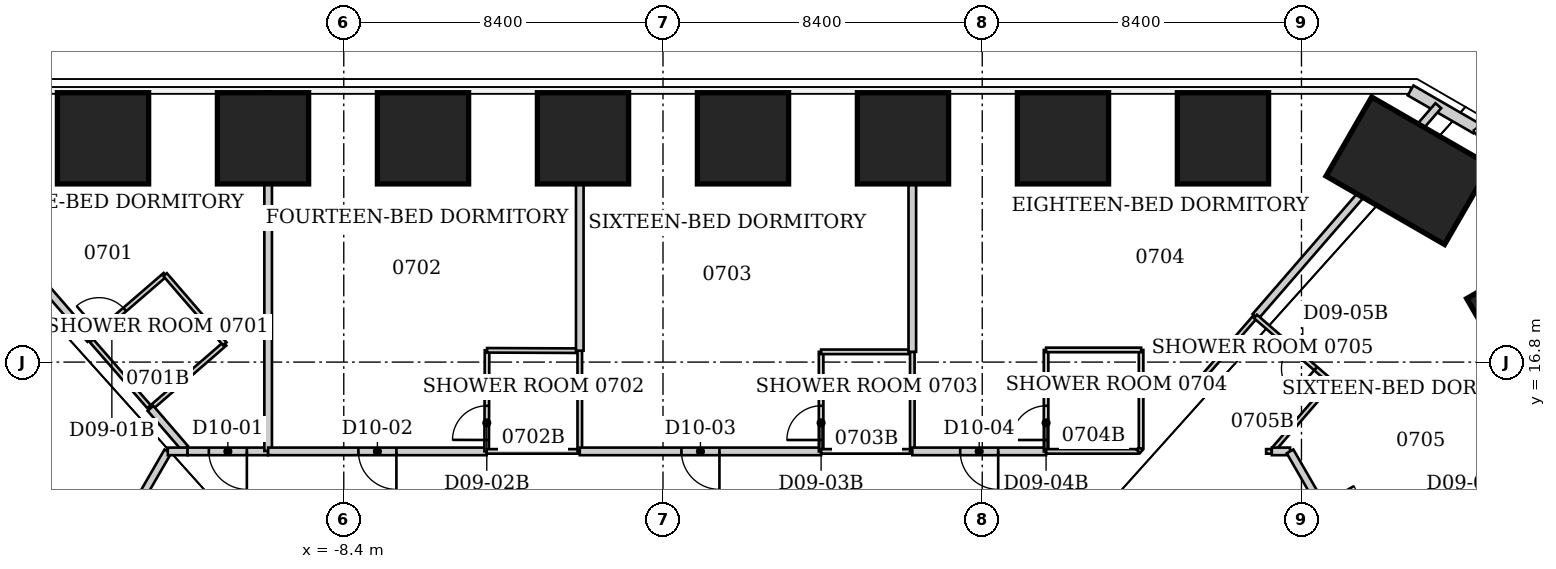
"""IFC4 building model, lengths in metres.
Left out: names, types, materials, properties, quantities, classifications, styles, units other than length and angle.
Written with IfcOpenShell. Run it as: python <this file> out.ifc"""

import sys

from ifc_helpers import new_model, si_unit, direction, frame, frame_2d, origin, origin_2d, place, context, subcontext, project, spatial, rectangle, extrude, element, fill, save


model = new_model("IFC4")
c1 = context("Model", 3, precision=1e-05, world=origin(), true_north=direction((0.0, 1.0)))
c2 = subcontext(c1, "Body", "Model", "MODEL_VIEW")
j1 = project(units=[si_unit("LENGTHUNIT", "METRE"), si_unit("PLANEANGLEUNIT", "RADIAN")], contexts=[c1])
p1 = place(None, origin())
s1 = spatial("IfcSite", under=j1, at=p1, CompositionType="ELEMENT")
p2 = place(p1, origin())
s2 = spatial("IfcBuilding", under=s1, at=p2, CompositionType="ELEMENT")
p3 = place(p2, frame((0.0, 0.0, 34.4)))
s3 = spatial("IfcBuildingStorey", under=s2, at=p3, CompositionType="ELEMENT", Elevation=34.4)
for number, where, z_axis, x_axis in (
    (1, (-14.735, 22.689, 0.0), (0.0, 0.0, 1.0), (0.0, 1.0, 0.0)),
    (2, (-10.525, 22.689, 0.0), (0.0, 0.0, 1.0), (0.0, 1.0, 0.0)),
    (3, (-6.315, 22.689, 0.0), (0.0, 0.0, 1.0), (0.0, 1.0, 0.0)),
    (4, (-2.105, 22.689, 0.0), (0.0, 0.0, 1.0), (0.0, 1.0, 0.0)),
    (5, (2.105, 22.689, 0.0), (0.0, 0.0, 1.0), (0.0, 1.0, 0.0)),
    (6, (6.315, 22.689, 0.0), (0.0, 0.0, 1.0), (0.0, 1.0, 0.0)),
    (7, (10.525, 22.689, 0.0), (0.0, 0.0, 1.0), (0.0, 1.0, 0.0)),
    (8, (14.735, 22.689, 0.0), (0.0, 0.0, 1.0), (0.0, 1.0, 0.0)),
):
    element("IfcColumn", number, at=place(p3, frame(where, z_axis=z_axis, x_axis=x_axis)), inside=s3, PredefinedType="COLUMN", context=c2, shape_type="SweptSolid", body=[
        extrude(rectangle(XDim=2.4, YDim=2.4, at=origin_2d()), origin(), (0.0, 0.0, 1.0), 3.8),
    ])
p4 = place(p3, frame((19.606, 21.835, 0.0), z_axis=(0.0, 0.0, 1.0), x_axis=(0.5, 0.866025403784, 0.0)))
e9 = element("IfcColumn", 9, at=p4, inside=s3, PredefinedType="COLUMN", context=c2, shape_type="SweptSolid", body=[
    extrude(rectangle(XDim=2.4, YDim=3.6, at=origin_2d()), origin(), (0.0, 0.0, 1.0), 3.8),
])
p5 = place(p3, frame((22.788, 18.032, 0.0), z_axis=(0.0, 0.0, 1.0), x_axis=(0.866025403784, 0.5, 0.0)))
e10 = element("IfcColumn", 10, at=p5, inside=s3, PredefinedType="COLUMN", context=c2, shape_type="SweptSolid", body=[
    extrude(rectangle(XDim=2.4, YDim=2.4, at=origin_2d()), origin(), (0.0, 0.0, 1.0), 3.8),
])
p6 = place(p3, frame((19.672, 23.949, 0.0), z_axis=(0.0, 0.0, 1.0), x_axis=(0.866010750942, -0.50002537861, 0.0)))
e11 = element("IfcWall", 11, at=p6, inside=s3, PredefinedType="SOLIDWALL", context=c2, shape_type="SweptSolid", body=[
    extrude(rectangle(XDim=2.0, YDim=0.3, at=frame_2d((1.0, 0.0))), origin(), (0.0, 0.0, 1.0), 3.64),
])
p7 = place(p3, frame((-20.4, 23.547, 0.0), z_axis=(0.0, 0.0, 1.0), x_axis=(0.655107582677, -0.755535608108, 0.0)))
e12 = element("IfcWall", 12, at=p7, inside=s3, PredefinedType="PARTITIONING", context=c2, shape_type="SweptSolid", body=[
    extrude(rectangle(XDim=8.136, YDim=0.2, at=frame_2d((4.068, 0.0))), origin(), (0.0, 0.0, 1.0), 3.64),
])
p8 = place(p3, frame((-16.031, 9.261, 0.0), z_axis=(0.0, 0.0, 1.0), x_axis=(0.500702302597, 0.865619549325, 0.0)))
e13 = element("IfcWall", 13, at=p8, inside=s3, PredefinedType="PARTITIONING", context=c2, shape_type="SweptSolid", body=[
    extrude(rectangle(XDim=5.995, YDim=0.2, at=frame_2d((2.997, 0.0))), origin(), (0.0, 0.0, 1.0), 3.64),
])
p9 = place(p8, frame((2.697, 0.0, 0.0)))
e14 = element("IfcOpeningElement", 14, at=p9, cuts=e13, PredefinedType="OPENING", context=c2, shape_type="SweptSolid", body=[
    extrude(rectangle(XDim=1.0, YDim=2.13, at=frame_2d((0.5, 1.065))), frame((0.0, 0.1, 0.0), z_axis=(0.0, -1.0, 0.0), x_axis=(1.0, 0.0, 0.0)), (0.0, 0.0, 1.0), 0.2),
])
p10 = place(p3, frame((-15.07, 17.4, 0.0), z_axis=(0.0, 0.0, 1.0), x_axis=(0.657083550002, -0.753817755374, 0.0)))
e15 = element("IfcWall", 15, at=p10, inside=s3, PredefinedType="PARTITIONING", context=c2, shape_type="SweptSolid", body=[
    extrude(rectangle(XDim=2.41, YDim=0.12, at=frame_2d((1.205, 0.0))), origin(), (0.0, 0.0, 1.0), 3.64),
])
p11 = place(p3, frame((-13.49, 15.58, 0.0), z_axis=(0.0, 0.0, 1.0), x_axis=(0.755437535555, 0.655220672655, 0.0)))
e16 = element("IfcWall", 16, at=p11, inside=s3, PredefinedType="PARTITIONING", context=c2, shape_type="SweptSolid", body=[
    extrude(rectangle(XDim=2.594, YDim=0.12, at=frame_2d((1.297, 0.0))), origin(), (0.0, 0.0, 1.0), 3.64),
])
p12 = place(p3, frame((-13.486, 15.583, 0.0), z_axis=(0.0, 0.0, 1.0), x_axis=(0.652755533609, -0.75756861956, 0.0)))
e17 = element("IfcWall", 17, at=p12, inside=s3, PredefinedType="PARTITIONING", context=c2, shape_type="SweptSolid", body=[
    extrude(rectangle(XDim=1.391, YDim=0.2, at=frame_2d((0.695, 0.0))), origin(), (0.0, 0.0, 1.0), 3.64),
])
p13 = place(p3, frame((-13.1, 19.1, 0.0), z_axis=(0.0, 0.0, 1.0), x_axis=(-0.757040252764, -0.65336823897, 0.0)))
e18 = element("IfcWall", 18, at=p13, inside=s3, PredefinedType="PARTITIONING", context=c2, shape_type="SweptSolid", body=[
    extrude(rectangle(XDim=2.602, YDim=0.12, at=frame_2d((1.301, 0.0))), origin(), (0.0, 0.0, 1.0), 3.64),
])
p14 = place(p13, frame((1.402, 0.0, 0.0)))
e19 = element("IfcOpeningElement", 19, at=p14, cuts=e18, PredefinedType="OPENING", context=c2, shape_type="SweptSolid", body=[
    extrude(rectangle(XDim=0.9, YDim=2.03, at=frame_2d((0.45, 1.015))), frame((0.0, 0.06, 0.0), z_axis=(0.0, -1.0, 0.0), x_axis=(1.0, 0.0, 0.0)), (0.0, 0.0, 1.0), 0.12),
])
p15 = place(p3, frame((-12.51, 14.45, 0.0), z_axis=(0.0, 0.0, 1.0), x_axis=(-1.0, 0.0, 0.0)))
e20 = element("IfcWall", 20, at=p15, inside=s3, PredefinedType="PARTITIONING", context=c2, shape_type="SweptSolid", body=[
    extrude(rectangle(XDim=0.52, YDim=0.2, at=frame_2d((0.26, 0.0))), origin(), (0.0, 0.0, 1.0), 3.64),
])
p16 = place(p3, frame((-11.53, 17.28, 0.0), z_axis=(0.0, 0.0, 1.0), x_axis=(-0.653188728136, 0.757195143563, 0.0)))
e21 = element("IfcWall", 21, at=p16, inside=s3, PredefinedType="PARTITIONING", context=c2, shape_type="SweptSolid", body=[
    extrude(rectangle(XDim=2.404, YDim=0.12, at=frame_2d((1.202, 0.0))), origin(), (0.0, 0.0, 1.0), 3.64),
])
p17 = place(p3, frame((-10.39, 14.45, 0.0), z_axis=(0.0, 0.0, 1.0), x_axis=(-1.0, 0.0, 0.0)))
e22 = element("IfcWall", 22, at=p17, inside=s3, PredefinedType="PARTITIONING", context=c2, shape_type="SweptSolid", body=[
    extrude(rectangle(XDim=2.12, YDim=0.2, at=frame_2d((1.06, 0.0))), origin(), (0.0, 0.0, 1.0), 3.64),
])
p18 = place(p17, frame((0.56, 0.0, 0.0)))
e23 = element("IfcOpeningElement", 23, at=p18, cuts=e22, PredefinedType="OPENING", context=c2, shape_type="SweptSolid", body=[
    extrude(rectangle(XDim=1.0, YDim=2.13, at=frame_2d((0.5, 1.065))), frame((0.0, 0.1, 0.0), z_axis=(0.0, -1.0, 0.0), x_axis=(1.0, 0.0, 0.0)), (0.0, 0.0, 1.0), 0.2),
])
p19 = place(p3, frame((-10.39, 23.92, 0.0), z_axis=(0.0, 0.0, 1.0), x_axis=(0.0, -1.0, 0.0)))
e24 = element("IfcWall", 24, at=p19, inside=s3, PredefinedType="PARTITIONING", context=c2, shape_type="SweptSolid", body=[
    extrude(rectangle(XDim=9.46, YDim=0.2, at=frame_2d((4.73, 0.0))), origin(), (0.0, 0.0, 1.0), 3.64),
])
p20 = place(p3, frame((-4.64, 14.45, 0.0), z_axis=(0.0, 0.0, 1.0), x_axis=(-1.0, 0.0, 0.0)))
e25 = element("IfcWall", 25, at=p20, inside=s3, PredefinedType="PARTITIONING", context=c2, shape_type="SweptSolid", body=[
    extrude(rectangle(XDim=5.75, YDim=0.2, at=frame_2d((2.875, 0.0))), origin(), (0.0, 0.0, 1.0), 3.64),
])
p21 = place(p20, frame((2.375, 0.0, 0.0)))
e26 = element("IfcOpeningElement", 26, at=p21, cuts=e25, PredefinedType="OPENING", context=c2, shape_type="SweptSolid", body=[
    extrude(rectangle(XDim=1.0, YDim=2.13, at=frame_2d((0.5, 1.065))), frame((0.0, 0.1, 0.0), z_axis=(0.0, -1.0, 0.0), x_axis=(1.0, 0.0, 0.0)), (0.0, 0.0, 1.0), 0.2),
])
p22 = place(p3, frame((-4.63, 17.11, 0.0), z_axis=(0.0, 0.0, 1.0), x_axis=(-0.003762822113, -0.99999292056, 0.0)))
e27 = element("IfcWall", 27, at=p22, inside=s3, PredefinedType="PARTITIONING", context=c2, shape_type="SweptSolid", body=[
    extrude(rectangle(XDim=2.66, YDim=0.12, at=frame_2d((1.33, 0.0))), origin(), (0.0, 0.0, 1.0), 3.64),
])
p23 = place(p22, frame((1.46, 0.0, 0.0)))
e28 = element("IfcOpeningElement", 28, at=p23, cuts=e27, PredefinedType="OPENING", context=c2, shape_type="SweptSolid", body=[
    extrude(rectangle(XDim=0.9, YDim=2.03, at=frame_2d((0.45, 1.015))), frame((0.0, 0.06, 0.0), z_axis=(0.0, -1.0, 0.0), x_axis=(1.0, 0.0, 0.0)), (0.0, 0.0, 1.0), 0.12),
])
p24 = place(p3, frame((-2.19, 14.45, 0.0), z_axis=(0.0, 0.0, 1.0), x_axis=(-1.0, 0.0, 0.0)))
e29 = element("IfcWall", 29, at=p24, inside=s3, PredefinedType="PARTITIONING", context=c2, shape_type="SweptSolid", body=[
    extrude(rectangle(XDim=2.45, YDim=0.12, at=frame_2d((1.225, 0.0))), origin(), (0.0, 0.0, 1.0), 3.64),
])
p25 = place(p3, frame((-2.19, 17.1, 0.0), z_axis=(0.0, 0.0, 1.0), x_axis=(-0.999991585011, 0.004102426955, 0.0)))
e30 = element("IfcWall", 30, at=p25, inside=s3, PredefinedType="PARTITIONING", context=c2, shape_type="SweptSolid", body=[
    extrude(rectangle(XDim=2.44, YDim=0.12, at=frame_2d((1.22, 0.0))), origin(), (0.0, 0.0, 1.0), 3.64),
])
p26 = place(p3, frame((-2.19, 17.1, 0.0), z_axis=(0.0, 0.0, 1.0), x_axis=(0.0, -1.0, 0.0)))
e31 = element("IfcWall", 31, at=p26, inside=s3, PredefinedType="PARTITIONING", context=c2, shape_type="SweptSolid", body=[
    extrude(rectangle(XDim=2.65, YDim=0.12, at=frame_2d((1.325, 0.0))), origin(), (0.0, 0.0, 1.0), 2.878),
])
p27 = place(p3, frame((-2.19, 23.83, 0.0), z_axis=(0.0, 0.0, 1.0), x_axis=(0.0, -1.0, 0.0)))
e32 = element("IfcWall", 32, at=p27, inside=s3, PredefinedType="PARTITIONING", context=c2, shape_type="SweptSolid", body=[
    extrude(rectangle(XDim=6.73, YDim=0.2, at=frame_2d((3.365, 0.0))), origin(), (0.0, 0.0, 1.0), 2.878),
])
p28 = place(p3, frame((4.16, 14.45, 0.0), z_axis=(0.0, 0.0, 1.0), x_axis=(-1.0, 0.0, 0.0)))
e33 = element("IfcWall", 33, at=p28, inside=s3, PredefinedType="PARTITIONING", context=c2, shape_type="SweptSolid", body=[
    extrude(rectangle(XDim=6.35, YDim=0.2, at=frame_2d((3.175, 0.0))), origin(), (0.0, 0.0, 1.0), 3.64),
])
p29 = place(p28, frame((2.675, 0.0, 0.0)))
e34 = element("IfcOpeningElement", 34, at=p29, cuts=e33, PredefinedType="OPENING", context=c2, shape_type="SweptSolid", body=[
    extrude(rectangle(XDim=1.0, YDim=2.13, at=frame_2d((0.5, 1.065))), frame((0.0, 0.1, 0.0), z_axis=(0.0, -1.0, 0.0), x_axis=(1.0, 0.0, 0.0)), (0.0, 0.0, 1.0), 0.2),
])
p30 = place(p3, frame((4.16, 17.07, 0.0), z_axis=(0.0, 0.0, 1.0), x_axis=(0.0, -1.0, 0.0)))
e35 = element("IfcWall", 35, at=p30, inside=s3, PredefinedType="PARTITIONING", context=c2, shape_type="SweptSolid", body=[
    extrude(rectangle(XDim=2.62, YDim=0.12, at=frame_2d((1.31, 0.0))), origin(), (0.0, 0.0, 1.0), 2.878),
])
p31 = place(p30, frame((1.42, 0.0, 0.0)))
e36 = element("IfcOpeningElement", 36, at=p31, cuts=e35, PredefinedType="OPENING", context=c2, shape_type="SweptSolid", body=[
    extrude(rectangle(XDim=0.9, YDim=2.03, at=frame_2d((0.45, 1.015))), frame((0.0, 0.06, 0.0), z_axis=(0.0, -1.0, 0.0), x_axis=(1.0, 0.0, 0.0)), (0.0, 0.0, 1.0), 0.12),
])
for number, where, z_axis, x_axis in (
    (37, (6.56, 14.45, 0.0), (0.0, 0.0, 1.0), (-1.0, 0.0, 0.0)),
    (38, (6.56, 17.07, 0.0), (0.0, 0.0, 1.0), (-1.0, 0.0, 0.0)),
):
    element("IfcWall", number, at=place(p3, frame(where, z_axis=z_axis, x_axis=x_axis)), inside=s3, PredefinedType="PARTITIONING", context=c2, shape_type="SweptSolid", body=[
        extrude(rectangle(XDim=2.4, YDim=0.12, at=frame_2d((1.2, 0.0))), origin(), (0.0, 0.0, 1.0), 3.64),
    ])
p32 = place(p3, frame((6.56, 17.07, 0.0), z_axis=(0.0, 0.0, 1.0), x_axis=(0.0, -1.0, 0.0)))
e39 = element("IfcWall", 39, at=p32, inside=s3, PredefinedType="PARTITIONING", context=c2, shape_type="SweptSolid", body=[
    extrude(rectangle(XDim=2.62, YDim=0.12, at=frame_2d((1.31, 0.0))), origin(), (0.0, 0.0, 1.0), 3.64),
])
p33 = place(p3, frame((6.56, 23.83, 0.0), z_axis=(0.0, 0.0, 1.0), x_axis=(0.0, -1.0, 0.0)))
e40 = element("IfcWall", 40, at=p33, inside=s3, PredefinedType="PARTITIONING", context=c2, shape_type="SweptSolid", body=[
    extrude(rectangle(XDim=6.76, YDim=0.2, at=frame_2d((3.38, 0.0))), origin(), (0.0, 0.0, 1.0), 3.64),
])
p34 = place(p3, frame((10.08, 14.45, 0.0), z_axis=(0.0, 0.0, 1.0), x_axis=(-1.0, 0.0, 0.0)))
e41 = element("IfcWall", 41, at=p34, inside=s3, PredefinedType="PARTITIONING", context=c2, shape_type="SweptSolid", body=[
    extrude(rectangle(XDim=3.52, YDim=0.2, at=frame_2d((1.76, 0.0))), origin(), (0.0, 0.0, 1.0), 3.64),
])
p35 = place(p34, frame((1.26, 0.0, 0.0)))
e42 = element("IfcOpeningElement", 42, at=p35, cuts=e41, PredefinedType="OPENING", context=c2, shape_type="SweptSolid", body=[
    extrude(rectangle(XDim=1.0, YDim=2.13, at=frame_2d((0.5, 1.065))), frame((0.0, 0.1, 0.0), z_axis=(0.0, -1.0, 0.0), x_axis=(1.0, 0.0, 0.0)), (0.0, 0.0, 1.0), 0.2),
])
p36 = place(p3, frame((10.08, 17.12, 0.0), z_axis=(0.0, 0.0, 1.0), x_axis=(0.0, -1.0, 0.0)))
e43 = element("IfcWall", 43, at=p36, inside=s3, PredefinedType="PARTITIONING", context=c2, shape_type="SweptSolid", body=[
    extrude(rectangle(XDim=2.67, YDim=0.12, at=frame_2d((1.335, 0.0))), origin(), (0.0, 0.0, 1.0), 3.64),
])
p37 = place(p36, frame((1.47, 0.0, 0.0)))
e44 = element("IfcOpeningElement", 44, at=p37, cuts=e43, PredefinedType="OPENING", context=c2, shape_type="SweptSolid", body=[
    extrude(rectangle(XDim=0.9, YDim=2.03, at=frame_2d((0.45, 1.015))), frame((0.0, 0.06, 0.0), z_axis=(0.0, -1.0, 0.0), x_axis=(1.0, 0.0, 0.0)), (0.0, 0.0, 1.0), 0.12),
])
p38 = place(p3, frame((12.51, 14.45, 0.0), z_axis=(0.0, 0.0, 1.0), x_axis=(-1.0, 0.0, 0.0)))
e45 = element("IfcWall", 45, at=p38, inside=s3, PredefinedType="PARTITIONING", context=c2, shape_type="SweptSolid", body=[
    extrude(rectangle(XDim=2.43, YDim=0.12, at=frame_2d((1.215, 0.0))), origin(), (0.0, 0.0, 1.0), 3.64),
])
p39 = place(p3, frame((12.58, 14.53, 0.0), z_axis=(0.0, 0.0, 1.0), x_axis=(-0.658504607869, -0.752576694707, 0.0)))
e46 = element("IfcWall", 46, at=p39, inside=s3, PredefinedType="PARTITIONING", context=c2, shape_type="SweptSolid", body=[
    extrude(rectangle(XDim=0.106, YDim=0.12, at=frame_2d((0.053, 0.0))), origin(), (0.0, 0.0, 1.0), 3.64),
])
p40 = place(p3, frame((12.58, 14.53, 0.0), z_axis=(0.0, 0.0, 1.0), x_axis=(0.0, 1.0, 0.0)))
e47 = element("IfcWall", 47, at=p40, inside=s3, PredefinedType="PARTITIONING", context=c2, shape_type="SweptSolid", body=[
    extrude(rectangle(XDim=2.59, YDim=0.12, at=frame_2d((1.295, 0.0))), origin(), (0.0, 0.0, 1.0), 3.038),
])
p41 = place(p3, frame((12.58, 17.12, 0.0), z_axis=(0.0, 0.0, 1.0), x_axis=(-1.0, 0.0, 0.0)))
e48 = element("IfcWall", 48, at=p41, inside=s3, PredefinedType="PARTITIONING", context=c2, shape_type="SweptSolid", body=[
    extrude(rectangle(XDim=2.5, YDim=0.12, at=frame_2d((1.25, 0.0))), origin(), (0.0, 0.0, 1.0), 3.64),
])
p42 = place(p3, frame((13.95, 16.11, 0.0), z_axis=(0.0, 0.0, 1.0), x_axis=(0.655390967201, 0.75528979876, 0.0)))
e49 = element("IfcWall", 49, at=p42, inside=s3, PredefinedType="PARTITIONING", context=c2, shape_type="SweptSolid", body=[
    extrude(rectangle(XDim=2.502, YDim=0.12, at=frame_2d((1.251, 0.0))), origin(), (0.0, 0.0, 1.0), 3.64),
])
p43 = place(p3, frame((15.59, 18.0, 0.0), z_axis=(0.0, 0.0, 1.0), x_axis=(0.655131789558, 0.755514618197, 0.0)))
e50 = element("IfcWall", 50, at=p43, inside=s3, PredefinedType="PARTITIONING", context=c2, shape_type="SweptSolid", body=[
    extrude(rectangle(XDim=7.343, YDim=0.2, at=frame_2d((3.671, 0.0))), origin(), (0.0, 0.0, 1.0), 3.64),
])
p44 = place(p3, frame((16.02, 14.45, 0.0), z_axis=(0.0, 0.0, 1.0), x_axis=(-1.0, 0.0, 0.0)))
e51 = element("IfcWall", 51, at=p44, inside=s3, PredefinedType="PARTITIONING", context=c2, shape_type="SweptSolid", body=[
    extrude(rectangle(XDim=0.15, YDim=0.12, at=frame_2d((0.075, 0.0))), origin(), (0.0, 0.0, 1.0), 3.64),
])
p45 = place(p3, frame((16.082, 14.522, 0.0), z_axis=(0.0, 0.0, 1.0), x_axis=(0.653217802971, 0.757170061401, 0.0)))
e52 = element("IfcWall", 52, at=p45, inside=s3, PredefinedType="PARTITIONING", context=c2, shape_type="SweptSolid", body=[
    extrude(rectangle(XDim=2.309, YDim=0.12, at=frame_2d((1.154, 0.0))), origin(), (0.0, 0.0, 1.0), 3.64),
])
p46 = place(p3, frame((16.5, 14.45, 0.0), z_axis=(0.0, 0.0, 1.0), x_axis=(-1.0, 0.0, 0.0)))
e53 = element("IfcWall", 53, at=p46, inside=s3, PredefinedType="PARTITIONING", context=c2, shape_type="SweptSolid", body=[
    extrude(rectangle(XDim=0.48, YDim=0.2, at=frame_2d((0.24, 0.0))), origin(), (0.0, 0.0, 1.0), 3.64),
])
p47 = place(p3, frame((16.5, 14.45, 0.0), z_axis=(0.0, 0.0, 1.0), x_axis=(0.499689380994, -0.866204665493, 0.0)))
e54 = element("IfcWall", 54, at=p47, inside=s3, PredefinedType="PARTITIONING", context=c2, shape_type="SweptSolid", body=[
    extrude(rectangle(XDim=4.26, YDim=0.2, at=frame_2d((2.13, 0.0))), origin(), (0.0, 0.0, 1.0), 3.64),
])
p48 = place(p47, frame((1.63, 0.0, 0.0)))
e55 = element("IfcOpeningElement", 55, at=p48, cuts=e54, PredefinedType="OPENING", context=c2, shape_type="SweptSolid", body=[
    extrude(rectangle(XDim=1.0, YDim=2.13, at=frame_2d((0.5, 1.065))), frame((0.0, 0.1, 0.0), z_axis=(0.0, -1.0, 0.0), x_axis=(1.0, 0.0, 0.0)), (0.0, 0.0, 1.0), 0.2),
])
p49 = place(p3, frame((17.59, 16.27, 0.0), z_axis=(0.0, 0.0, 1.0), x_axis=(-0.756316256301, 0.6542061758, 0.0)))
e56 = element("IfcWall", 56, at=p49, inside=s3, PredefinedType="PARTITIONING", context=c2, shape_type="SweptSolid", body=[
    extrude(rectangle(XDim=2.644, YDim=0.12, at=frame_2d((1.322, 0.0))), origin(), (0.0, 0.0, 1.0), 3.64),
])
p50 = place(p49, frame((0.55, 0.0, 0.0)))
e57 = element("IfcOpeningElement", 57, at=p50, cuts=e56, PredefinedType="OPENING", context=c2, shape_type="SweptSolid", body=[
    extrude(rectangle(XDim=0.9, YDim=2.03, at=frame_2d((0.45, 1.015))), frame((0.0, 0.06, 0.0), z_axis=(0.0, -1.0, 0.0), x_axis=(1.0, 0.0, 0.0)), (0.0, 0.0, 1.0), 0.12),
])
p51 = place(p3, frame((20.84, 12.03, 0.0), z_axis=(0.0, 0.0, 1.0), x_axis=(0.865529484494, 0.50085797535, 0.0)))
e58 = element("IfcWall", 58, at=p51, inside=s3, PredefinedType="PARTITIONING", context=c2, shape_type="SweptSolid", body=[
    extrude(rectangle(XDim=5.83, YDim=0.2, at=frame_2d((2.915, 0.0))), origin(), (0.0, 0.0, 1.0), 2.86),
])
p52 = place(p18, origin())
e59 = element("IfcDoor", 59, at=p52, inside=s3, OperationType="SINGLE_SWING_LEFT", PredefinedType="DOOR", context=c2, shape_type="SweptSolid", body=[
    extrude(rectangle(XDim=1.0, YDim=2.13, at=frame_2d((0.5, 1.065))), frame((0.0, 0.025, 0.0), z_axis=(0.0, -1.0, 0.0), x_axis=(1.0, 0.0, 0.0)), (0.0, 0.0, 1.0), 0.05),
])
fill(e23, e59)
p53 = place(p14, origin())
e60 = element("IfcDoor", 60, at=p53, inside=s3, OperationType="SINGLE_SWING_RIGHT", PredefinedType="DOOR", context=c2, shape_type="SweptSolid", body=[
    extrude(rectangle(XDim=0.9, YDim=2.03, at=frame_2d((0.45, 1.015))), frame((0.0, 0.025, 0.0), z_axis=(0.0, -1.0, 0.0), x_axis=(1.0, 0.0, 0.0)), (0.0, 0.0, 1.0), 0.05),
])
fill(e19, e60)
p54 = place(p21, origin())
e61 = element("IfcDoor", 61, at=p54, inside=s3, OperationType="SINGLE_SWING_LEFT", PredefinedType="DOOR", context=c2, shape_type="SweptSolid", body=[
    extrude(rectangle(XDim=1.0, YDim=2.13, at=frame_2d((0.5, 1.065))), frame((0.0, 0.025, 0.0), z_axis=(0.0, -1.0, 0.0), x_axis=(1.0, 0.0, 0.0)), (0.0, 0.0, 1.0), 0.05),
])
fill(e26, e61)
p55 = place(p23, origin())
e62 = element("IfcDoor", 62, at=p55, inside=s3, OperationType="SINGLE_SWING_RIGHT", PredefinedType="DOOR", context=c2, shape_type="SweptSolid", body=[
    extrude(rectangle(XDim=0.9, YDim=2.03, at=frame_2d((0.45, 1.015))), frame((0.0, 0.025, 0.0), z_axis=(0.0, -1.0, 0.0), x_axis=(1.0, 0.0, 0.0)), (0.0, 0.0, 1.0), 0.05),
])
fill(e28, e62)
p56 = place(p29, origin())
e63 = element("IfcDoor", 63, at=p56, inside=s3, OperationType="SINGLE_SWING_LEFT", PredefinedType="DOOR", context=c2, shape_type="SweptSolid", body=[
    extrude(rectangle(XDim=1.0, YDim=2.13, at=frame_2d((0.5, 1.065))), frame((0.0, 0.025, 0.0), z_axis=(0.0, -1.0, 0.0), x_axis=(1.0, 0.0, 0.0)), (0.0, 0.0, 1.0), 0.05),
])
fill(e34, e63)
p57 = place(p31, origin())
e64 = element("IfcDoor", 64, at=p57, inside=s3, OperationType="SINGLE_SWING_RIGHT", PredefinedType="DOOR", context=c2, shape_type="SweptSolid", body=[
    extrude(rectangle(XDim=0.9, YDim=2.03, at=frame_2d((0.45, 1.015))), frame((0.0, 0.025, 0.0), z_axis=(0.0, -1.0, 0.0), x_axis=(1.0, 0.0, 0.0)), (0.0, 0.0, 1.0), 0.05),
])
fill(e36, e64)
p58 = place(p35, origin())
e65 = element("IfcDoor", 65, at=p58, inside=s3, OperationType="SINGLE_SWING_LEFT", PredefinedType="DOOR", context=c2, shape_type="SweptSolid", body=[
    extrude(rectangle(XDim=1.0, YDim=2.13, at=frame_2d((0.5, 1.065))), frame((0.0, 0.025, 0.0), z_axis=(0.0, -1.0, 0.0), x_axis=(1.0, 0.0, 0.0)), (0.0, 0.0, 1.0), 0.05),
])
fill(e42, e65)
p59 = place(p37, origin())
e66 = element("IfcDoor", 66, at=p59, inside=s3, OperationType="SINGLE_SWING_RIGHT", PredefinedType="DOOR", context=c2, shape_type="SweptSolid", body=[
    extrude(rectangle(XDim=0.9, YDim=2.03, at=frame_2d((0.45, 1.015))), frame((0.0, 0.025, 0.0), z_axis=(0.0, -1.0, 0.0), x_axis=(1.0, 0.0, 0.0)), (0.0, 0.0, 1.0), 0.05),
])
fill(e44, e66)
p60 = place(p50, origin())
e67 = element("IfcDoor", 67, at=p60, inside=s3, OperationType="SINGLE_SWING_LEFT", PredefinedType="DOOR", context=c2, shape_type="SweptSolid", body=[
    extrude(rectangle(XDim=0.9, YDim=2.03, at=frame_2d((0.45, 1.015))), frame((0.0, 0.025, 0.0), z_axis=(0.0, -1.0, 0.0), x_axis=(1.0, 0.0, 0.0)), (0.0, 0.0, 1.0), 0.05),
])
fill(e57, e67)
save(model, sys.argv[1])
